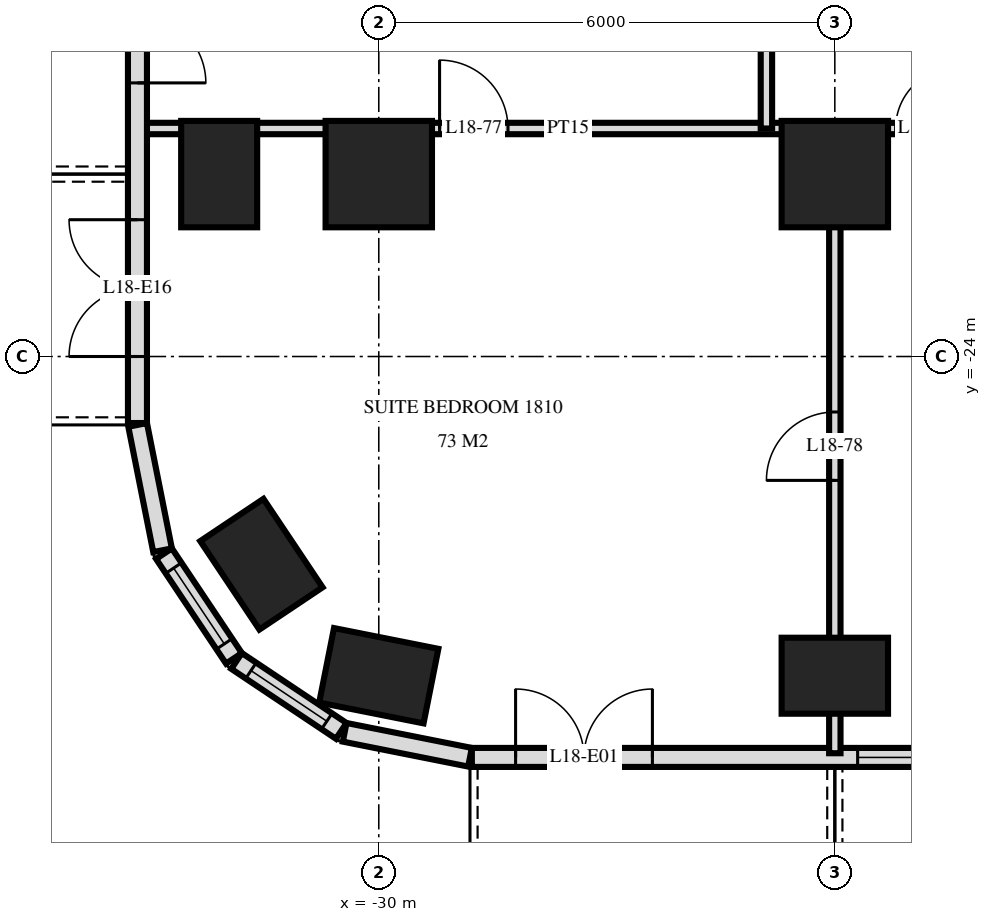
"""IFC4 building model, lengths in metres.
Left out: names, types, materials, properties, quantities, classifications, styles, units other than length and angle.
Written with IfcOpenShell. Run it as: python <this file> out.ifc"""

import sys

from ifc_helpers import new_model, si_unit, direction, frame, frame_2d, origin, origin_2d, place, context, subcontext, project, spatial, rectangle, extrude, element, fill, save


model = new_model("IFC4")
c1 = context("Model", 3, precision=1e-05, world=origin(), true_north=direction((0.0, 1.0)))
c2 = subcontext(c1, "Body", "Model", "MODEL_VIEW")
j1 = project(units=[si_unit("LENGTHUNIT", "METRE"), si_unit("PLANEANGLEUNIT", "RADIAN")], contexts=[c1])
p1 = place(None, origin())
s1 = spatial("IfcSite", under=j1, at=p1, CompositionType="ELEMENT")
p2 = place(p1, origin())
s2 = spatial("IfcBuilding", under=s1, at=p2, CompositionType="ELEMENT")
p3 = place(p2, frame((0.0, 0.0, 74.4)))
s3 = spatial("IfcBuildingStorey", under=s2, at=p3, CompositionType="ELEMENT", Elevation=74.4)
for number, where, z_axis, x_axis in (
    (1, (-32.1, -21.6, 0.0), (0.0, 0.0, 1.0), (0.0, 1.0, 0.0)),
    (2, (-31.544, -26.733, 0.0), (0.0, 0.0, 1.0), (-0.556, 0.831, 0.0)),
    (3, (-30.0, -28.2, 0.0), (0.0, 0.0, 1.0), (-0.981, 0.195, 0.0)),
):
    element("IfcColumn", number, at=place(p3, frame(where, z_axis=z_axis, x_axis=x_axis)), inside=s3, PredefinedType="COLUMN", context=c2, shape_type="SweptSolid", body=[
        extrude(rectangle(XDim=1.4, YDim=1.0, at=origin_2d()), origin(), (0.0, 0.0, 1.0), 3.6),
    ])
p4 = place(p3, frame((-30.0, -21.6, 0.0), z_axis=(0.0, 0.0, 1.0), x_axis=(1.0, 0.0, 0.0)))
e4 = element("IfcColumn", 4, at=p4, inside=s3, PredefinedType="COLUMN", context=c2, shape_type="SweptSolid", body=[
    extrude(rectangle(XDim=1.4, YDim=1.4, at=origin_2d()), origin(), (0.0, 0.0, 1.0), 3.6),
])
p5 = place(p3, frame((-24.0, -28.2, 0.0), z_axis=(0.0, 0.0, 1.0), x_axis=(1.0, 0.0, 0.0)))
e5 = element("IfcColumn", 5, at=p5, inside=s3, PredefinedType="COLUMN", context=c2, shape_type="SweptSolid", body=[
    extrude(rectangle(XDim=1.4, YDim=1.0, at=origin_2d()), origin(), (0.0, 0.0, 1.0), 3.6),
])
p6 = place(p3, frame((-24.0, -21.6, 0.0), z_axis=(0.0, 0.0, 1.0), x_axis=(1.0, 0.0, 0.0)))
e6 = element("IfcColumn", 6, at=p6, inside=s3, PredefinedType="COLUMN", context=c2, shape_type="SweptSolid", body=[
    extrude(rectangle(XDim=1.4, YDim=1.4, at=origin_2d()), origin(), (0.0, 0.0, 1.0), 3.6),
])
p7 = place(p3, frame((-33.175, -3.325, 0.0), z_axis=(0.0, 0.0, 1.0), x_axis=(0.0, -1.0, 0.0)))
e7 = element("IfcWall", 7, at=p7, inside=s3, PredefinedType="SOLIDWALL", context=c2, shape_type="SweptSolid", body=[
    extrude(rectangle(XDim=21.551, YDim=0.25, at=frame_2d((10.775, 0.0))), origin(), (0.0, 0.0, 1.0), 3.32),
])
p8 = place(p7, frame((6.65, 0.0, 0.0)))
e8 = element("IfcOpeningElement", 8, at=p8, cuts=e7, PredefinedType="OPENING", context=c2, shape_type="SweptSolid", body=[
    extrude(rectangle(XDim=1.8, YDim=2.4, at=frame_2d((0.9, 1.2))), frame((0.0, 0.135, 0.0), z_axis=(0.0, -1.0, 0.0), x_axis=(1.0, 0.0, 0.0)), (0.0, 0.0, 1.0), 0.27),
])
p9 = place(p7, frame((12.575, 0.0, 0.3)))
e9 = element("IfcOpeningElement", 9, at=p9, cuts=e7, PredefinedType="OPENING", context=c2, shape_type="SweptSolid", body=[
    extrude(rectangle(XDim=1.2, YDim=2.1, at=frame_2d((0.6, 1.05))), frame((0.0, 0.135, 0.0), z_axis=(0.0, -1.0, 0.0), x_axis=(1.0, 0.0, 0.0)), (0.0, 0.0, 1.0), 0.27),
])
p10 = place(p7, frame((15.275, 0.0, 0.0)))
e10 = element("IfcOpeningElement", 10, at=p10, cuts=e7, PredefinedType="OPENING", context=c2, shape_type="SweptSolid", body=[
    extrude(rectangle(XDim=1.8, YDim=2.4, at=frame_2d((0.9, 1.2))), frame((0.0, 0.135, 0.0), z_axis=(0.0, -1.0, 0.0), x_axis=(1.0, 0.0, 0.0)), (0.0, 0.0, 1.0), 0.27),
])
p11 = place(p7, frame((18.875, 0.0, 0.0)))
e11 = element("IfcOpeningElement", 11, at=p11, cuts=e7, PredefinedType="OPENING", context=c2, shape_type="SweptSolid", body=[
    extrude(rectangle(XDim=1.8, YDim=2.4, at=frame_2d((0.9, 1.2))), frame((0.0, 0.135, 0.0), z_axis=(0.0, -1.0, 0.0), x_axis=(1.0, 0.0, 0.0)), (0.0, 0.0, 1.0), 0.27),
])
p12 = place(p3, frame((-33.173, -24.9, 0.0), z_axis=(0.0, 0.0, 1.0), x_axis=(0.195166572128, -0.980770110232, 0.0)))
e12 = element("IfcWall", 12, at=p12, inside=s3, PredefinedType="SOLIDWALL", context=c2, shape_type="SweptSolid", body=[
    extrude(rectangle(XDim=1.681, YDim=0.25, at=frame_2d((0.841, 0.0))), origin(), (0.0, 0.0, 1.0), 3.32),
])
p13 = place(p3, frame((-32.826, -26.594, 0.0), z_axis=(0.0, 0.0, 1.0), x_axis=(0.55555029066, -0.831482937015, 0.0)))
e13 = element("IfcWall", 13, at=p13, inside=s3, PredefinedType="SOLIDWALL", context=c2, shape_type="SweptSolid", body=[
    extrude(rectangle(XDim=1.656, YDim=0.25, at=frame_2d((0.828, 0.0))), origin(), (0.0, 0.0, 1.0), 3.32),
])
p14 = place(p13, frame((0.228, 0.0, 0.9)))
e14 = element("IfcOpeningElement", 14, at=p14, cuts=e13, PredefinedType="OPENING", context=c2, shape_type="SweptSolid", body=[
    extrude(rectangle(XDim=1.2, YDim=1.5, at=frame_2d((0.6, 0.75))), frame((0.0, 0.135, 0.0), z_axis=(0.0, -1.0, 0.0), x_axis=(1.0, 0.0, 0.0)), (0.0, 0.0, 1.0), 0.27),
])
p15 = place(p3, frame((-31.871, -28.006, 0.0), z_axis=(0.0, 0.0, 1.0), x_axis=(0.831482937015, -0.55555029066, 0.0)))
e15 = element("IfcWall", 15, at=p15, inside=s3, PredefinedType="SOLIDWALL", context=c2, shape_type="SweptSolid", body=[
    extrude(rectangle(XDim=1.656, YDim=0.25, at=frame_2d((0.828, 0.0))), origin(), (0.0, 0.0, 1.0), 3.32),
])
p16 = place(p15, frame((0.228, 0.0, 0.9)))
e16 = element("IfcOpeningElement", 16, at=p16, cuts=e15, PredefinedType="OPENING", context=c2, shape_type="SweptSolid", body=[
    extrude(rectangle(XDim=1.2, YDim=1.5, at=frame_2d((0.6, 0.75))), frame((0.0, 0.135, 0.0), z_axis=(0.0, -1.0, 0.0), x_axis=(1.0, 0.0, 0.0)), (0.0, 0.0, 1.0), 0.27),
])
p17 = place(p3, frame((-30.449, -28.945, 0.0), z_axis=(0.0, 0.0, 1.0), x_axis=(0.980775640221, -0.19513878023, 0.0)))
e17 = element("IfcWall", 17, at=p17, inside=s3, PredefinedType="SOLIDWALL", context=c2, shape_type="SweptSolid", body=[
    extrude(rectangle(XDim=1.681, YDim=0.25, at=frame_2d((0.841, 0.0))), origin(), (0.0, 0.0, 1.0), 3.32),
])
p18 = place(p3, frame((-28.775, -29.275, 0.0), z_axis=(0.0, 0.0, 1.0), x_axis=(1.0, 0.0, 0.0)))
e18 = element("IfcWall", 18, at=p18, inside=s3, PredefinedType="SOLIDWALL", context=c2, shape_type="SweptSolid", body=[
    extrude(rectangle(XDim=57.551, YDim=0.25, at=frame_2d((28.775, 0.0))), origin(), (0.0, 0.0, 1.0), 3.32),
])
p19 = place(p18, frame((0.575, 0.0, 0.0)))
e19 = element("IfcOpeningElement", 19, at=p19, cuts=e18, PredefinedType="OPENING", context=c2, shape_type="SweptSolid", body=[
    extrude(rectangle(XDim=1.8, YDim=2.4, at=frame_2d((0.9, 1.2))), frame((0.0, 0.135, 0.0), z_axis=(0.0, -1.0, 0.0), x_axis=(1.0, 0.0, 0.0)), (0.0, 0.0, 1.0), 0.27),
])
p20 = place(p18, frame((5.075, 0.0, 0.3)))
e20 = element("IfcOpeningElement", 20, at=p20, cuts=e18, PredefinedType="OPENING", context=c2, shape_type="SweptSolid", body=[
    extrude(rectangle(XDim=2.4, YDim=2.1, at=frame_2d((1.2, 1.05))), frame((0.0, 0.135, 0.0), z_axis=(0.0, -1.0, 0.0), x_axis=(1.0, 0.0, 0.0)), (0.0, 0.0, 1.0), 0.27),
])
p21 = place(p18, frame((8.375, 0.0, 0.0)))
e21 = element("IfcOpeningElement", 21, at=p21, cuts=e18, PredefinedType="OPENING", context=c2, shape_type="SweptSolid", body=[
    extrude(rectangle(XDim=1.8, YDim=2.4, at=frame_2d((0.9, 1.2))), frame((0.0, 0.135, 0.0), z_axis=(0.0, -1.0, 0.0), x_axis=(1.0, 0.0, 0.0)), (0.0, 0.0, 1.0), 0.27),
])
p22 = place(p18, frame((11.375, 0.0, 0.0)))
e22 = element("IfcOpeningElement", 22, at=p22, cuts=e18, PredefinedType="OPENING", context=c2, shape_type="SweptSolid", body=[
    extrude(rectangle(XDim=1.8, YDim=2.4, at=frame_2d((0.9, 1.2))), frame((0.0, 0.135, 0.0), z_axis=(0.0, -1.0, 0.0), x_axis=(1.0, 0.0, 0.0)), (0.0, 0.0, 1.0), 0.27),
])
p23 = place(p18, frame((14.075, 0.0, 0.3)))
e23 = element("IfcOpeningElement", 23, at=p23, cuts=e18, PredefinedType="OPENING", context=c2, shape_type="SweptSolid", body=[
    extrude(rectangle(XDim=2.4, YDim=2.1, at=frame_2d((1.2, 1.05))), frame((0.0, 0.135, 0.0), z_axis=(0.0, -1.0, 0.0), x_axis=(1.0, 0.0, 0.0)), (0.0, 0.0, 1.0), 0.27),
])
p24 = place(p18, frame((17.375, 0.0, 0.0)))
e24 = element("IfcOpeningElement", 24, at=p24, cuts=e18, PredefinedType="OPENING", context=c2, shape_type="SweptSolid", body=[
    extrude(rectangle(XDim=1.8, YDim=2.4, at=frame_2d((0.9, 1.2))), frame((0.0, 0.135, 0.0), z_axis=(0.0, -1.0, 0.0), x_axis=(1.0, 0.0, 0.0)), (0.0, 0.0, 1.0), 0.27),
])
p25 = place(p18, frame((20.075, 0.0, 0.3)))
e25 = element("IfcOpeningElement", 25, at=p25, cuts=e18, PredefinedType="OPENING", context=c2, shape_type="SweptSolid", body=[
    extrude(rectangle(XDim=2.4, YDim=2.1, at=frame_2d((1.2, 1.05))), frame((0.0, 0.135, 0.0), z_axis=(0.0, -1.0, 0.0), x_axis=(1.0, 0.0, 0.0)), (0.0, 0.0, 1.0), 0.27),
])
p26 = place(p18, frame((23.075, 0.0, 0.3)))
e26 = element("IfcOpeningElement", 26, at=p26, cuts=e18, PredefinedType="OPENING", context=c2, shape_type="SweptSolid", body=[
    extrude(rectangle(XDim=2.4, YDim=2.1, at=frame_2d((1.2, 1.05))), frame((0.0, 0.135, 0.0), z_axis=(0.0, -1.0, 0.0), x_axis=(1.0, 0.0, 0.0)), (0.0, 0.0, 1.0), 0.27),
])
p27 = place(p18, frame((26.375, 0.0, 0.0)))
e27 = element("IfcOpeningElement", 27, at=p27, cuts=e18, PredefinedType="OPENING", context=c2, shape_type="SweptSolid", body=[
    extrude(rectangle(XDim=1.8, YDim=2.4, at=frame_2d((0.9, 1.2))), frame((0.0, 0.135, 0.0), z_axis=(0.0, -1.0, 0.0), x_axis=(1.0, 0.0, 0.0)), (0.0, 0.0, 1.0), 0.27),
])
p28 = place(p18, frame((29.375, 0.0, 0.0)))
e28 = element("IfcOpeningElement", 28, at=p28, cuts=e18, PredefinedType="OPENING", context=c2, shape_type="SweptSolid", body=[
    extrude(rectangle(XDim=1.8, YDim=2.4, at=frame_2d((0.9, 1.2))), frame((0.0, 0.135, 0.0), z_axis=(0.0, -1.0, 0.0), x_axis=(1.0, 0.0, 0.0)), (0.0, 0.0, 1.0), 0.27),
])
p29 = place(p18, frame((32.075, 0.0, 0.3)))
e29 = element("IfcOpeningElement", 29, at=p29, cuts=e18, PredefinedType="OPENING", context=c2, shape_type="SweptSolid", body=[
    extrude(rectangle(XDim=2.4, YDim=2.1, at=frame_2d((1.2, 1.05))), frame((0.0, 0.135, 0.0), z_axis=(0.0, -1.0, 0.0), x_axis=(1.0, 0.0, 0.0)), (0.0, 0.0, 1.0), 0.27),
])
p30 = place(p18, frame((35.375, 0.0, 0.0)))
e30 = element("IfcOpeningElement", 30, at=p30, cuts=e18, PredefinedType="OPENING", context=c2, shape_type="SweptSolid", body=[
    extrude(rectangle(XDim=1.8, YDim=2.4, at=frame_2d((0.9, 1.2))), frame((0.0, 0.135, 0.0), z_axis=(0.0, -1.0, 0.0), x_axis=(1.0, 0.0, 0.0)), (0.0, 0.0, 1.0), 0.27),
])
p31 = place(p18, frame((38.075, 0.0, 0.3)))
e31 = element("IfcOpeningElement", 31, at=p31, cuts=e18, PredefinedType="OPENING", context=c2, shape_type="SweptSolid", body=[
    extrude(rectangle(XDim=2.4, YDim=2.1, at=frame_2d((1.2, 1.05))), frame((0.0, 0.135, 0.0), z_axis=(0.0, -1.0, 0.0), x_axis=(1.0, 0.0, 0.0)), (0.0, 0.0, 1.0), 0.27),
])
p32 = place(p18, frame((41.075, 0.0, 0.3)))
e32 = element("IfcOpeningElement", 32, at=p32, cuts=e18, PredefinedType="OPENING", context=c2, shape_type="SweptSolid", body=[
    extrude(rectangle(XDim=2.4, YDim=2.1, at=frame_2d((1.2, 1.05))), frame((0.0, 0.135, 0.0), z_axis=(0.0, -1.0, 0.0), x_axis=(1.0, 0.0, 0.0)), (0.0, 0.0, 1.0), 0.27),
])
p33 = place(p18, frame((44.375, 0.0, 0.0)))
e33 = element("IfcOpeningElement", 33, at=p33, cuts=e18, PredefinedType="OPENING", context=c2, shape_type="SweptSolid", body=[
    extrude(rectangle(XDim=1.8, YDim=2.4, at=frame_2d((0.9, 1.2))), frame((0.0, 0.135, 0.0), z_axis=(0.0, -1.0, 0.0), x_axis=(1.0, 0.0, 0.0)), (0.0, 0.0, 1.0), 0.27),
])
p34 = place(p18, frame((47.075, 0.0, 0.3)))
e34 = element("IfcOpeningElement", 34, at=p34, cuts=e18, PredefinedType="OPENING", context=c2, shape_type="SweptSolid", body=[
    extrude(rectangle(XDim=2.4, YDim=2.1, at=frame_2d((1.2, 1.05))), frame((0.0, 0.135, 0.0), z_axis=(0.0, -1.0, 0.0), x_axis=(1.0, 0.0, 0.0)), (0.0, 0.0, 1.0), 0.27),
])
p35 = place(p18, frame((50.375, 0.0, 0.0)))
e35 = element("IfcOpeningElement", 35, at=p35, cuts=e18, PredefinedType="OPENING", context=c2, shape_type="SweptSolid", body=[
    extrude(rectangle(XDim=1.8, YDim=2.4, at=frame_2d((0.9, 1.2))), frame((0.0, 0.135, 0.0), z_axis=(0.0, -1.0, 0.0), x_axis=(1.0, 0.0, 0.0)), (0.0, 0.0, 1.0), 0.27),
])
p36 = place(p18, frame((53.375, 0.0, 0.0)))
e36 = element("IfcOpeningElement", 36, at=p36, cuts=e18, PredefinedType="OPENING", context=c2, shape_type="SweptSolid", body=[
    extrude(rectangle(XDim=1.8, YDim=2.4, at=frame_2d((0.9, 1.2))), frame((0.0, 0.135, 0.0), z_axis=(0.0, -1.0, 0.0), x_axis=(1.0, 0.0, 0.0)), (0.0, 0.0, 1.0), 0.27),
])
p37 = place(p3, frame((-24.0, -29.22, 0.0), z_axis=(0.0, 0.0, 1.0), x_axis=(0.0, 1.0, 0.0)))
e37 = element("IfcWall", 37, at=p37, inside=s3, PredefinedType="PARTITIONING", context=c2, shape_type="SweptSolid", body=[
    extrude(rectangle(XDim=8.22, YDim=0.15, at=frame_2d((4.11, 0.0))), origin(), (0.0, 0.0, 1.0), 3.32),
])
p38 = place(p37, frame((3.59, 0.0, 0.0)))
e38 = element("IfcOpeningElement", 38, at=p38, cuts=e37, PredefinedType="OPENING", context=c2, shape_type="SweptSolid", body=[
    extrude(rectangle(XDim=0.9, YDim=2.1, at=frame_2d((0.45, 1.05))), frame((0.0, 0.085, 0.0), z_axis=(0.0, -1.0, 0.0), x_axis=(1.0, 0.0, 0.0)), (0.0, 0.0, 1.0), 0.17),
])
p39 = place(p3, frame((-24.9, -21.0, 0.0), z_axis=(0.0, 0.0, 1.0), x_axis=(0.0, 1.0, 0.0)))
e39 = element("IfcWall", 39, at=p39, inside=s3, PredefinedType="PARTITIONING", context=c2, shape_type="SweptSolid", body=[
    extrude(rectangle(XDim=3.0, YDim=0.15, at=frame_2d((1.5, 0.0))), origin(), (0.0, 0.0, 1.0), 3.32),
])
p40 = place(p3, frame((-33.12, -21.0, 0.0), z_axis=(0.0, 0.0, 1.0), x_axis=(1.0, 0.0, 0.0)))
e40 = element("IfcWall", 40, at=p40, inside=s3, PredefinedType="PARTITIONING", context=c2, shape_type="SweptSolid", body=[
    extrude(rectangle(XDim=11.22, YDim=0.15, at=frame_2d((5.61, 0.0))), origin(), (0.0, 0.0, 1.0), 3.32),
])
p41 = place(p40, frame((9.92, 0.0, 0.0)))
e41 = element("IfcOpeningElement", 41, at=p41, cuts=e40, PredefinedType="OPENING", context=c2, shape_type="SweptSolid", body=[
    extrude(rectangle(XDim=0.8, YDim=2.1, at=frame_2d((0.4, 1.05))), frame((0.0, 0.085, 0.0), z_axis=(0.0, -1.0, 0.0), x_axis=(1.0, 0.0, 0.0)), (0.0, 0.0, 1.0), 0.17),
])
p42 = place(p40, frame((3.92, 0.0, 0.0)))
e42 = element("IfcOpeningElement", 42, at=p42, cuts=e40, PredefinedType="OPENING", context=c2, shape_type="SweptSolid", body=[
    extrude(rectangle(XDim=0.9, YDim=2.1, at=frame_2d((0.45, 1.05))), frame((0.0, 0.085, 0.0), z_axis=(0.0, -1.0, 0.0), x_axis=(1.0, 0.0, 0.0)), (0.0, 0.0, 1.0), 0.17),
])
p43 = place(p14, origin())
e43 = element("IfcWindow", 43, at=p43, inside=s3, PartitioningType="SINGLE_PANEL", PredefinedType="WINDOW", context=c2, shape_type="SweptSolid", body=[
    extrude(rectangle(XDim=1.2, YDim=1.5, at=frame_2d((0.6, 0.75))), frame((0.0, 0.03, 0.0), z_axis=(0.0, -1.0, 0.0), x_axis=(1.0, 0.0, 0.0)), (0.0, 0.0, 1.0), 0.06),
])
fill(e14, e43)
p44 = place(p16, origin())
e44 = element("IfcWindow", 44, at=p44, inside=s3, PartitioningType="SINGLE_PANEL", PredefinedType="WINDOW", context=c2, shape_type="SweptSolid", body=[
    extrude(rectangle(XDim=1.2, YDim=1.5, at=frame_2d((0.6, 0.75))), frame((0.0, 0.03, 0.0), z_axis=(0.0, -1.0, 0.0), x_axis=(1.0, 0.0, 0.0)), (0.0, 0.0, 1.0), 0.06),
])
fill(e16, e44)
p45 = place(p19, origin())
e45 = element("IfcDoor", 45, at=p45, inside=s3, OperationType="DOUBLE_DOOR_SINGLE_SWING", PredefinedType="DOOR", context=c2, shape_type="SweptSolid", body=[
    extrude(rectangle(XDim=1.8, YDim=2.4, at=frame_2d((0.9, 1.2))), frame((0.0, 0.025, 0.0), z_axis=(0.0, -1.0, 0.0), x_axis=(1.0, 0.0, 0.0)), (0.0, 0.0, 1.0), 0.05),
])
fill(e19, e45)
p46 = place(p20, origin())
e46 = element("IfcWindow", 46, at=p46, inside=s3, PartitioningType="SINGLE_PANEL", PredefinedType="WINDOW", context=c2, shape_type="SweptSolid", body=[
    extrude(rectangle(XDim=2.4, YDim=2.1, at=frame_2d((1.2, 1.05))), frame((0.0, 0.03, 0.0), z_axis=(0.0, -1.0, 0.0), x_axis=(1.0, 0.0, 0.0)), (0.0, 0.0, 1.0), 0.06),
])
fill(e20, e46)
p47 = place(p10, origin())
e47 = element("IfcDoor", 47, at=p47, inside=s3, OperationType="DOUBLE_DOOR_SINGLE_SWING", PredefinedType="DOOR", context=c2, shape_type="SweptSolid", body=[
    extrude(rectangle(XDim=1.8, YDim=2.4, at=frame_2d((0.9, 1.2))), frame((0.0, 0.025, 0.0), z_axis=(0.0, -1.0, 0.0), x_axis=(1.0, 0.0, 0.0)), (0.0, 0.0, 1.0), 0.05),
])
fill(e10, e47)
p48 = place(p11, frame((0.9, 0.0, 0.0), z_axis=(0.0, 0.0, 1.0), x_axis=(-1.0, 0.0, 0.0)))
e48 = element("IfcDoor", 48, at=p48, inside=s3, OperationType="DOUBLE_DOOR_SINGLE_SWING", PredefinedType="DOOR", context=c2, shape_type="SweptSolid", body=[
    extrude(rectangle(XDim=1.8, YDim=2.4, at=frame_2d((0.0, 1.2))), frame((0.0, -0.025, 0.0), z_axis=(0.0, 1.0, 0.0), x_axis=(-1.0, 0.0, 0.0)), (0.0, 0.0, 1.0), 0.05),
])
fill(e11, e48)
p49 = place(p41, origin())
e49 = element("IfcDoor", 49, at=p49, inside=s3, OperationType="SINGLE_SWING_LEFT", PredefinedType="DOOR", context=c2, shape_type="SweptSolid", body=[
    extrude(rectangle(XDim=0.8, YDim=2.1, at=frame_2d((0.4, 1.05))), frame((0.0, 0.025, 0.0), z_axis=(0.0, -1.0, 0.0), x_axis=(1.0, 0.0, 0.0)), (0.0, 0.0, 1.0), 0.05),
])
fill(e41, e49)
p50 = place(p42, origin())
e50 = element("IfcDoor", 50, at=p50, inside=s3, OperationType="SINGLE_SWING_RIGHT", PredefinedType="DOOR", context=c2, shape_type="SweptSolid", body=[
    extrude(rectangle(XDim=0.9, YDim=2.1, at=frame_2d((0.45, 1.05))), frame((0.0, 0.025, 0.0), z_axis=(0.0, -1.0, 0.0), x_axis=(1.0, 0.0, 0.0)), (0.0, 0.0, 1.0), 0.05),
])
fill(e42, e50)
p51 = place(p38, origin())
e51 = element("IfcDoor", 51, at=p51, inside=s3, OperationType="SINGLE_SWING_RIGHT", PredefinedType="DOOR", context=c2, shape_type="SweptSolid", body=[
    extrude(rectangle(XDim=0.9, YDim=2.1, at=frame_2d((0.45, 1.05))), frame((0.0, 0.025, 0.0), z_axis=(0.0, -1.0, 0.0), x_axis=(1.0, 0.0, 0.0)), (0.0, 0.0, 1.0), 0.05),
])
fill(e38, e51)
save(model, sys.argv[1])
